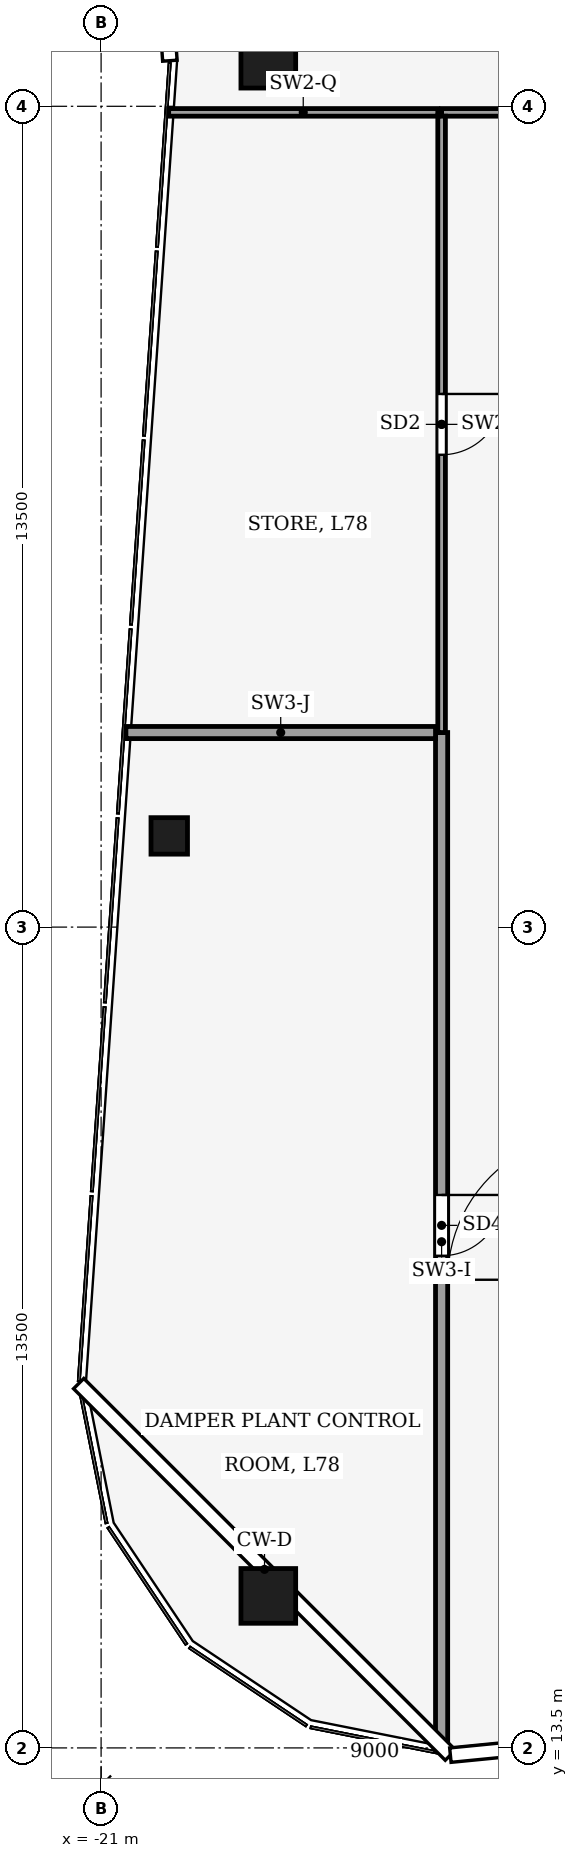
"""IFC4 building model, lengths in metres.
Left out: names, types, materials, properties, quantities, classifications, styles, units other than length and angle.
Written with IfcOpenShell. Run it as: python <this file> out.ifc"""

import sys

from ifc_helpers import new_model, si_unit, direction, frame, frame_2d, origin, origin_2d, place, context, subcontext, project, spatial, rectangle, hollow_rectangle, extrude, element, fill, save


model = new_model("IFC4")
c1 = context("Model", 3, precision=1e-05, world=origin(), true_north=direction((0.0, 1.0)))
c2 = subcontext(c1, "Body", "Model", "MODEL_VIEW")
j1 = project(units=[si_unit("LENGTHUNIT", "METRE"), si_unit("PLANEANGLEUNIT", "RADIAN")], contexts=[c1])
p1 = place(None, origin())
s1 = spatial("IfcSite", under=j1, at=p1, CompositionType="ELEMENT")
p2 = place(p1, origin())
s2 = spatial("IfcBuilding", under=s1, at=p2, CompositionType="ELEMENT")
p3 = place(p2, frame((0.0, 0.0, 340.5)))
s3 = spatial("IfcBuildingStorey", under=s2, at=p3, CompositionType="ELEMENT", Elevation=340.5)
for number, where, z_axis, x_axis in (
    (1, (-18.25, 16.0, 0.0), (0.0, 0.0, 1.0), (1.0, 0.0, 0.0)),
    (2, (-18.25, 41.25, 0.0), (0.0, 0.0, 1.0), (1.0, 0.0, 0.0)),
):
    element("IfcColumn", number, at=place(p3, frame(where, z_axis=z_axis, x_axis=x_axis)), inside=s3, PredefinedType="COLUMN", context=c2, shape_type="SweptSolid", body=[
        extrude(hollow_rectangle(XDim=0.9, YDim=0.9, WallThickness=0.04, at=origin_2d()), origin(), (0.0, 0.0, 1.0), 9.0),
    ])
p4 = place(p3, frame((-19.879, 28.5, 0.0), z_axis=(0.0, 0.0, 1.0), x_axis=(1.0, 0.0, 0.0)))
e3 = element("IfcColumn", 3, at=p4, inside=s3, PredefinedType="COLUMN", context=c2, shape_type="SweptSolid", body=[
    extrude(hollow_rectangle(XDim=0.6, YDim=0.6, WallThickness=0.025, at=origin_2d()), origin(), (0.0, 0.0, 1.0), 9.0),
])
p5 = place(p3, frame((15.4, 40.4, 0.0), z_axis=(0.0, 0.0, 1.0), x_axis=(-1.0, 0.0, 0.0)))
e4 = element("IfcWall", 4, at=p5, inside=s3, PredefinedType="PARTITIONING", context=c2, shape_type="SweptSolid", body=[
    extrude(rectangle(XDim=30.8, YDim=0.125, at=frame_2d((15.4, 0.0))), origin(), (0.0, 0.0, 1.0), 8.37),
])
p6 = place(p5, frame((22.5, 0.0, 0.0)))
e5 = element("IfcOpeningElement", 5, at=p6, cuts=e4, PredefinedType="OPENING", context=c2, shape_type="SweptSolid", body=[
    extrude(rectangle(XDim=1.8, YDim=2.4, at=frame_2d((0.9, 1.2))), frame((0.0, 0.073, 0.0), z_axis=(0.0, -1.0, 0.0), x_axis=(1.0, 0.0, 0.0)), (0.0, 0.0, 1.0), 0.145),
])
p7 = place(p5, frame((6.5, 0.0, 0.0)))
e6 = element("IfcOpeningElement", 6, at=p7, cuts=e4, PredefinedType="OPENING", context=c2, shape_type="SweptSolid", body=[
    extrude(rectangle(XDim=1.8, YDim=2.4, at=frame_2d((0.9, 1.2))), frame((0.0, 0.073, 0.0), z_axis=(0.0, -1.0, 0.0), x_axis=(1.0, 0.0, 0.0)), (0.0, 0.0, 1.0), 0.145),
])
p8 = place(p3, frame((-15.4, 30.2, 0.0), z_axis=(0.0, 0.0, 1.0), x_axis=(0.0, -1.0, 0.0)))
e7 = element("IfcWall", 7, at=p8, inside=s3, PredefinedType="PARTITIONING", context=c2, shape_type="SweptSolid", body=[
    extrude(rectangle(XDim=16.75, YDim=0.2, at=frame_2d((8.375, 0.0))), origin(), (0.0, 0.0, 1.0), 7.812),
])
p9 = place(p8, frame((7.605, 0.0, 0.0)))
e8 = element("IfcOpeningElement", 8, at=p9, cuts=e7, PredefinedType="OPENING", context=c2, shape_type="SweptSolid", body=[
    extrude(rectangle(XDim=1.0, YDim=2.1, at=frame_2d((0.5, 1.05))), frame((0.0, 0.11, 0.0), z_axis=(0.0, -1.0, 0.0), x_axis=(1.0, 0.0, 0.0)), (0.0, 0.0, 1.0), 0.22),
])
p10 = place(p3, frame((-15.4, 40.337, 0.0), z_axis=(0.0, 0.0, 1.0), x_axis=(0.0, -1.0, 0.0)))
e9 = element("IfcWall", 9, at=p10, inside=s3, PredefinedType="PARTITIONING", context=c2, shape_type="SweptSolid", body=[
    extrude(rectangle(XDim=10.137, YDim=0.125, at=frame_2d((5.069, 0.0))), origin(), (0.0, 0.0, 1.0), 8.12),
])
p11 = place(p10, frame((4.569, 0.0, 0.0)))
e10 = element("IfcOpeningElement", 10, at=p11, cuts=e9, PredefinedType="OPENING", context=c2, shape_type="SweptSolid", body=[
    extrude(rectangle(XDim=1.0, YDim=2.1, at=frame_2d((0.5, 1.05))), frame((0.0, 0.073, 0.0), z_axis=(0.0, -1.0, 0.0), x_axis=(1.0, 0.0, 0.0)), (0.0, 0.0, 1.0), 0.145),
])
p12 = place(p3, frame((-15.462, 40.4, 0.0), z_axis=(0.0, 0.0, 1.0), x_axis=(-1.0, 0.0, 0.0)))
e11 = element("IfcWall", 11, at=p12, inside=s3, PredefinedType="PARTITIONING", context=c2, shape_type="SweptSolid", body=[
    extrude(rectangle(XDim=4.426, YDim=0.125, at=frame_2d((2.213, 0.0))), origin(), (0.0, 0.0, 1.0), 8.02),
])
p13 = place(p3, frame((-20.592, 30.2, 0.0), z_axis=(0.0, 0.0, 1.0), x_axis=(1.0, 0.0, 0.0)))
e12 = element("IfcWall", 12, at=p13, inside=s3, PredefinedType="PARTITIONING", context=c2, shape_type="SweptSolid", body=[
    extrude(rectangle(XDim=5.092, YDim=0.2, at=frame_2d((2.546, 0.0))), origin(), (0.0, 0.0, 1.0), 8.02),
])
p14 = place(p9, origin())
e13 = element("IfcDoor", 13, at=p14, inside=s3, OperationType="SINGLE_SWING_LEFT", PredefinedType="DOOR", context=c2, shape_type="SweptSolid", body=[
    extrude(rectangle(XDim=1.0, YDim=2.1, at=frame_2d((0.5, 1.05))), frame((0.0, 0.025, 0.0), z_axis=(0.0, -1.0, 0.0), x_axis=(1.0, 0.0, 0.0)), (0.0, 0.0, 1.0), 0.05),
])
fill(e8, e13)
p15 = place(p11, origin())
e14 = element("IfcDoor", 14, at=p15, inside=s3, OperationType="SINGLE_SWING_RIGHT", PredefinedType="DOOR", context=c2, shape_type="SweptSolid", body=[
    extrude(rectangle(XDim=1.0, YDim=2.1, at=frame_2d((0.5, 1.05))), frame((0.0, 0.025, 0.0), z_axis=(0.0, -1.0, 0.0), x_axis=(1.0, 0.0, 0.0)), (0.0, 0.0, 1.0), 0.05),
])
fill(e10, e14)
save(model, sys.argv[1])
